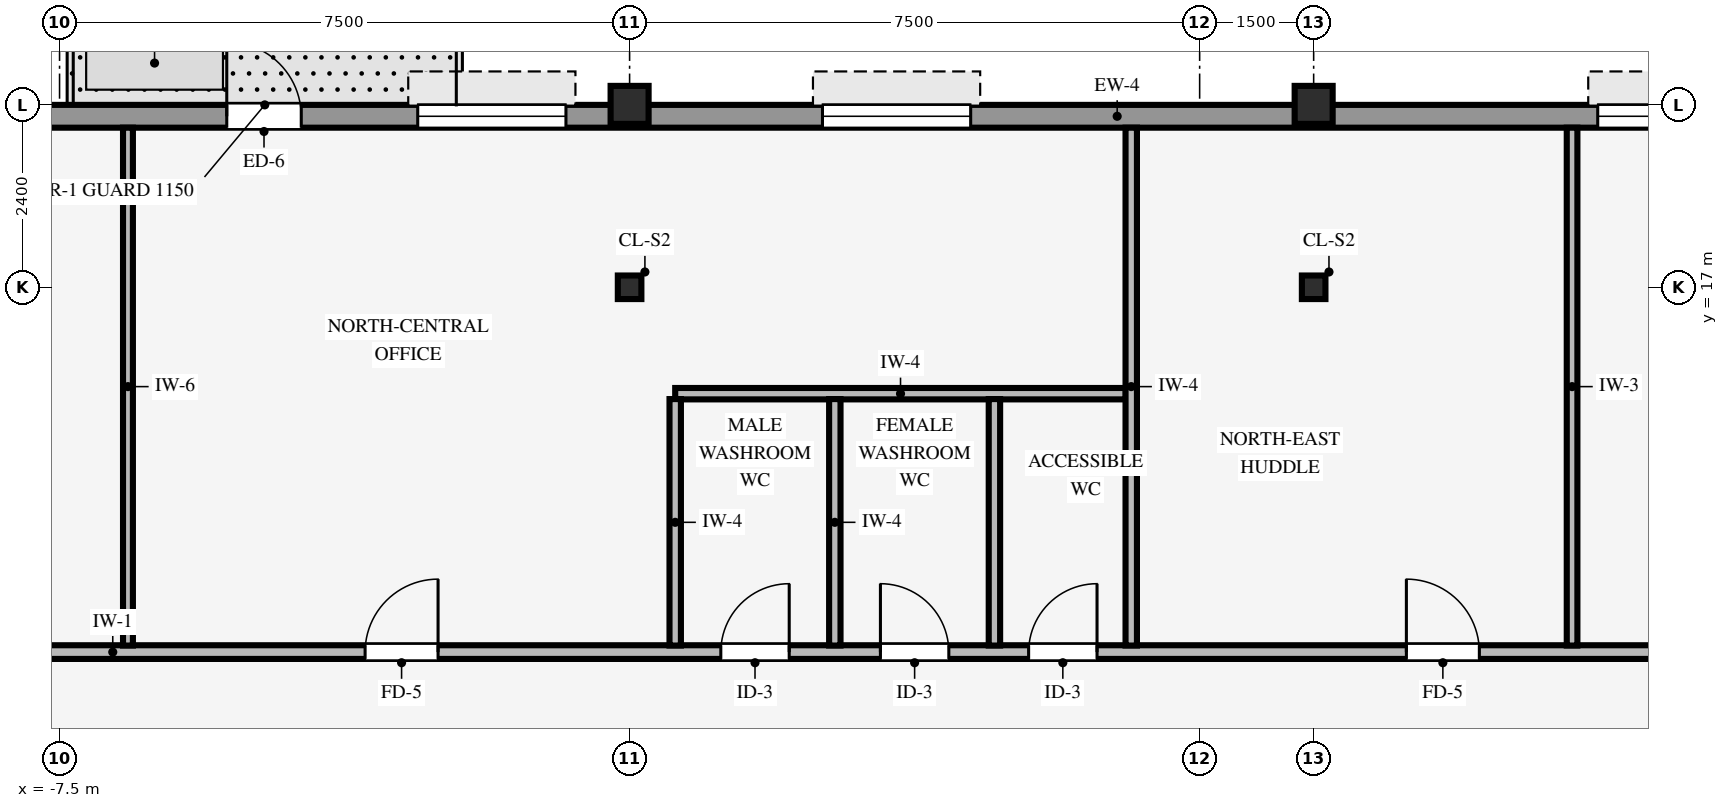
"""IFC4 building model, lengths in metres.
Left out: names, types, materials, properties, quantities, classifications, styles, units other than length and angle.
Written with IfcOpenShell. Run it as: python <this file> out.ifc"""

import sys

from ifc_helpers import new_model, si_unit, direction, frame, frame_2d, origin, origin_2d, place, context, subcontext, project, spatial, rectangle, hollow_rectangle, i_section, extrude, source, transform, mapped, element, fill, save


model = new_model("IFC4")
c1 = context("Model", 3, precision=1e-05, world=origin(), true_north=direction((0.0, 1.0)))
c2 = subcontext(c1, "Body", "Model", "MODEL_VIEW")
j1 = project(units=[si_unit("LENGTHUNIT", "METRE"), si_unit("PLANEANGLEUNIT", "RADIAN")], contexts=[c1])
p1 = place(None, origin())
s1 = spatial("IfcSite", under=j1, at=p1, CompositionType="ELEMENT")
p2 = place(p1, origin())
s2 = spatial("IfcBuilding", under=s1, at=p2, CompositionType="ELEMENT")
p3 = place(p2, frame((0.0, 0.0, 234.7)))
s3 = spatial("IfcBuildingStorey", under=s2, at=p3, CompositionType="ELEMENT", Elevation=234.7)
for number, where, z_axis, x_axis in (
    (1, (0.0, 19.4, 0.0), (0.0, 0.0, 1.0), (1.0, 0.0, 0.0)),
    (2, (9.0, 19.4, 0.0), (0.0, 0.0, 1.0), (1.0, 0.0, 0.0)),
):
    element("IfcColumn", number, at=place(p3, frame(where, z_axis=z_axis, x_axis=x_axis)), inside=s3, PredefinedType="COLUMN", context=c2, shape_type="SweptSolid", body=[
        extrude(hollow_rectangle(XDim=0.5, YDim=0.5, WallThickness=0.032, InnerFilletRadius=0.032, OuterFilletRadius=0.064, at=origin_2d()), origin(), (0.0, 0.0, 1.0), 3.37),
    ])
for number, where, z_axis, x_axis in (
    (3, (0.0, 17.0, 0.0), (0.0, 0.0, 1.0), (1.0, 0.0, 0.0)),
    (4, (9.0, 17.0, 0.0), (0.0, 0.0, 1.0), (1.0, 0.0, 0.0)),
):
    element("IfcColumn", number, at=place(p3, frame(where, z_axis=z_axis, x_axis=x_axis)), inside=s3, PredefinedType="COLUMN", context=c2, shape_type="SweptSolid", body=[
        extrude(i_section(OverallWidth=0.31, OverallDepth=0.31, WebThickness=0.015, FlangeThickness=0.015, FilletRadius=0.015, at=origin_2d()), origin(), (0.0, 0.0, 1.0), 3.37),
    ])
p4 = place(p3, frame((-24.3, 19.25, 0.0), z_axis=(0.0, 0.0, 1.0), x_axis=(1.0, 0.0, 0.0)))
e5 = element("IfcWall", 5, at=p4, inside=s3, PredefinedType="STANDARD", context=c2, shape_type="SweptSolid", body=[
    extrude(rectangle(XDim=41.0, YDim=0.3, at=frame_2d((20.5, 0.0))), origin(), (0.0, 0.0, 1.0), 2.705),
])
p5 = place(p4, frame((19.0, 0.0, 0.0)))
e6 = element("IfcOpeningElement", 6, at=p5, cuts=e5, PredefinedType="OPENING", context=c2, shape_type="SweptSolid", body=[
    extrude(rectangle(XDim=0.98, YDim=2.15, at=frame_2d((0.49, 1.075))), frame((0.0, 0.16, 0.0), z_axis=(0.0, -1.0, 0.0), x_axis=(1.0, 0.0, 0.0)), (0.0, 0.0, 1.0), 0.32),
])
p6 = place(p4, frame((2.462, 0.0, 0.8)))
e7 = element("IfcOpeningElement", 7, at=p6, cuts=e5, PredefinedType="OPENING", context=c2, shape_type="SweptSolid", body=[
    extrude(rectangle(XDim=1.95, YDim=1.48, at=frame_2d((0.975, 0.74))), frame((0.0, 0.16, 0.0), z_axis=(0.0, -1.0, 0.0), x_axis=(1.0, 0.0, 0.0)), (0.0, 0.0, 1.0), 0.32),
])
p7 = place(p4, frame((7.337, 0.0, 0.8)))
e8 = element("IfcOpeningElement", 8, at=p7, cuts=e5, PredefinedType="OPENING", context=c2, shape_type="SweptSolid", body=[
    extrude(rectangle(XDim=1.95, YDim=1.48, at=frame_2d((0.975, 0.74))), frame((0.0, 0.16, 0.0), z_axis=(0.0, -1.0, 0.0), x_axis=(1.0, 0.0, 0.0)), (0.0, 0.0, 1.0), 0.32),
])
p8 = place(p4, frame((21.512, 0.0, 0.8)))
e9 = element("IfcOpeningElement", 9, at=p8, cuts=e5, PredefinedType="OPENING", context=c2, shape_type="SweptSolid", body=[
    extrude(rectangle(XDim=1.95, YDim=1.48, at=frame_2d((0.975, 0.74))), frame((0.0, 0.16, 0.0), z_axis=(0.0, -1.0, 0.0), x_axis=(1.0, 0.0, 0.0)), (0.0, 0.0, 1.0), 0.32),
])
p9 = place(p4, frame((26.837, 0.0, 0.8)))
e10 = element("IfcOpeningElement", 10, at=p9, cuts=e5, PredefinedType="OPENING", context=c2, shape_type="SweptSolid", body=[
    extrude(rectangle(XDim=1.95, YDim=1.48, at=frame_2d((0.975, 0.74))), frame((0.0, 0.16, 0.0), z_axis=(0.0, -1.0, 0.0), x_axis=(1.0, 0.0, 0.0)), (0.0, 0.0, 1.0), 0.32),
])
p10 = place(p4, frame((37.038, 0.0, 0.8)))
e11 = element("IfcOpeningElement", 11, at=p10, cuts=e5, PredefinedType="OPENING", context=c2, shape_type="SweptSolid", body=[
    extrude(rectangle(XDim=1.95, YDim=1.48, at=frame_2d((0.975, 0.74))), frame((0.0, 0.16, 0.0), z_axis=(0.0, -1.0, 0.0), x_axis=(1.0, 0.0, 0.0)), (0.0, 0.0, 1.0), 0.32),
])
p11 = place(p3, frame((-15.0, 12.2, 0.0), z_axis=(0.0, 0.0, 1.0), x_axis=(1.0, 0.0, 0.0)))
e12 = element("IfcWall", 12, at=p11, inside=s3, PredefinedType="PARTITIONING", context=c2, shape_type="SweptSolid", body=[
    extrude(rectangle(XDim=30.8, YDim=0.18, at=frame_2d((15.4, 0.0))), origin(), (0.0, 0.0, 1.0), 3.36),
])
p12 = place(p11, frame((11.52, 0.0, 0.0)))
e13 = element("IfcOpeningElement", 13, at=p12, cuts=e12, PredefinedType="OPENING", context=c2, shape_type="SweptSolid", body=[
    extrude(rectangle(XDim=0.96, YDim=2.1, at=frame_2d((0.48, 1.05))), frame((0.0, 0.1, 0.0), z_axis=(0.0, -1.0, 0.0), x_axis=(1.0, 0.0, 0.0)), (0.0, 0.0, 1.0), 0.2),
])
p13 = place(p11, frame((25.22, 0.0, 0.0)))
e14 = element("IfcOpeningElement", 14, at=p13, cuts=e12, PredefinedType="OPENING", context=c2, shape_type="SweptSolid", body=[
    extrude(rectangle(XDim=0.96, YDim=2.1, at=frame_2d((0.48, 1.05))), frame((0.0, 0.1, 0.0), z_axis=(0.0, -1.0, 0.0), x_axis=(1.0, 0.0, 0.0)), (0.0, 0.0, 1.0), 0.2),
])
p14 = place(p11, frame((28.62, 0.0, 0.0)))
e15 = element("IfcOpeningElement", 15, at=p14, cuts=e12, PredefinedType="OPENING", context=c2, shape_type="SweptSolid", body=[
    extrude(rectangle(XDim=0.96, YDim=2.1, at=frame_2d((0.48, 1.05))), frame((0.0, 0.1, 0.0), z_axis=(0.0, -1.0, 0.0), x_axis=(1.0, 0.0, 0.0)), (0.0, 0.0, 1.0), 0.2),
])
p15 = place(p11, frame((3.92, 0.0, 0.0)))
e16 = element("IfcOpeningElement", 16, at=p15, cuts=e12, PredefinedType="OPENING", context=c2, shape_type="SweptSolid", body=[
    extrude(rectangle(XDim=0.96, YDim=2.1, at=frame_2d((0.48, 1.05))), frame((0.0, 0.1, 0.0), z_axis=(0.0, -1.0, 0.0), x_axis=(1.0, 0.0, 0.0)), (0.0, 0.0, 1.0), 0.2),
])
p16 = place(p11, frame((16.2, 0.0, 0.0)))
e17 = element("IfcOpeningElement", 17, at=p16, cuts=e12, PredefinedType="OPENING", context=c2, shape_type="SweptSolid", body=[
    extrude(rectangle(XDim=0.9, YDim=2.1, at=frame_2d((0.45, 1.05))), frame((0.0, 0.1, 0.0), z_axis=(0.0, -1.0, 0.0), x_axis=(1.0, 0.0, 0.0)), (0.0, 0.0, 1.0), 0.2),
])
p17 = place(p11, frame((18.3, 0.0, 0.0)))
e18 = element("IfcOpeningElement", 18, at=p17, cuts=e12, PredefinedType="OPENING", context=c2, shape_type="SweptSolid", body=[
    extrude(rectangle(XDim=0.9, YDim=2.1, at=frame_2d((0.45, 1.05))), frame((0.0, 0.1, 0.0), z_axis=(0.0, -1.0, 0.0), x_axis=(1.0, 0.0, 0.0)), (0.0, 0.0, 1.0), 0.2),
])
p18 = place(p11, frame((20.25, 0.0, 0.0)))
e19 = element("IfcOpeningElement", 19, at=p18, cuts=e12, PredefinedType="OPENING", context=c2, shape_type="SweptSolid", body=[
    extrude(rectangle(XDim=0.9, YDim=2.1, at=frame_2d((0.45, 1.05))), frame((0.0, 0.1, 0.0), z_axis=(0.0, -1.0, 0.0), x_axis=(1.0, 0.0, 0.0)), (0.0, 0.0, 1.0), 0.2),
])
p19 = place(p3, frame((0.6, 15.6, 0.0), z_axis=(0.0, 0.0, 1.0), x_axis=(1.0, 0.0, 0.0)))
e20 = element("IfcWall", 20, at=p19, inside=s3, PredefinedType="PARTITIONING", context=c2, shape_type="SweptSolid", body=[
    extrude(rectangle(XDim=5.929, YDim=0.15, at=frame_2d((2.964, 0.0))), origin(), (0.0, 0.0, 1.0), 3.36),
])
p20 = place(p3, frame((-6.6, 12.286, 0.0), z_axis=(0.0, 0.0, 1.0), x_axis=(0.0, 1.0, 0.0)))
e21 = element("IfcWall", 21, at=p20, inside=s3, PredefinedType="PARTITIONING", context=c2, shape_type="SweptSolid", body=[
    extrude(rectangle(XDim=6.814, YDim=0.13, at=frame_2d((3.407, 0.0))), origin(), (0.0, 0.0, 1.0), 3.36),
])
for number, where, z_axis, x_axis in (
    (22, (0.6, 12.286, 0.0), (0.0, 0.0, 1.0), (0.0, 1.0, 0.0)),
    (23, (2.7, 12.286, 0.0), (0.0, 0.0, 1.0), (0.0, 1.0, 0.0)),
    (24, (4.8, 12.286, 0.0), (0.0, 0.0, 1.0), (0.0, 1.0, 0.0)),
):
    element("IfcWall", number, at=place(p3, frame(where, z_axis=z_axis, x_axis=x_axis)), inside=s3, PredefinedType="PARTITIONING", context=c2, shape_type="SweptSolid", body=[
        extrude(rectangle(XDim=3.243, YDim=0.15, at=frame_2d((1.622, 0.0))), origin(), (0.0, 0.0, 1.0), 3.36),
    ])
p21 = place(p3, frame((6.6, 12.286, 0.0), z_axis=(0.0, 0.0, 1.0), x_axis=(0.0, 1.0, 0.0)))
e25 = element("IfcWall", 25, at=p21, inside=s3, PredefinedType="PARTITIONING", context=c2, shape_type="SweptSolid", body=[
    extrude(rectangle(XDim=6.814, YDim=0.15, at=frame_2d((3.407, 0.0))), origin(), (0.0, 0.0, 1.0), 3.36),
])
p22 = place(p3, frame((12.4, 12.286, 0.0), z_axis=(0.0, 0.0, 1.0), x_axis=(0.0, 1.0, 0.0)))
e26 = element("IfcWall", 26, at=p22, inside=s3, PredefinedType="PARTITIONING", context=c2, shape_type="SweptSolid", body=[
    extrude(rectangle(XDim=6.814, YDim=0.14, at=frame_2d((3.407, 0.0))), origin(), (0.0, 0.0, 1.0), 3.36),
])
m1 = source(origin(), c2, "Body", "SweptSolid", [
    extrude(rectangle(XDim=0.98, YDim=2.15, at=frame_2d((0.49, 1.075))), frame((0.0, 0.025, 0.0), z_axis=(0.0, -1.0, 0.0), x_axis=(1.0, 0.0, 0.0)), (0.0, 0.0, 1.0), 0.05),
])
p23 = place(p5, origin())
e27 = element("IfcDoor", 27, at=p23, inside=s3, OperationType="SINGLE_SWING_LEFT", PredefinedType="DOOR", context=c2, shape_type="MappedRepresentation", body=[
    mapped(m1, transform((0.0, 0.0, 0.0), scale=1.0)),
])
fill(e6, e27)
m2 = source(origin(), c2, "Body", "SweptSolid", [
    extrude(rectangle(XDim=1.95, YDim=1.48, at=frame_2d((0.975, 0.74))), frame((0.0, 0.03, 0.0), z_axis=(0.0, -1.0, 0.0), x_axis=(1.0, 0.0, 0.0)), (0.0, 0.0, 1.0), 0.06),
])
p24 = place(p8, origin())
e28 = element("IfcWindow", 28, at=p24, inside=s3, PartitioningType="SINGLE_PANEL", PredefinedType="WINDOW", context=c2, shape_type="MappedRepresentation", body=[
    mapped(m2, transform((0.0, 0.0, 0.0), scale=1.0)),
])
fill(e9, e28)
p25 = place(p9, origin())
e29 = element("IfcWindow", 29, at=p25, inside=s3, PartitioningType="SINGLE_PANEL", PredefinedType="WINDOW", context=c2, shape_type="MappedRepresentation", body=[
    mapped(m2, transform((0.0, 0.0, 0.0), scale=1.0)),
])
fill(e10, e29)
p26 = place(p10, origin())
e30 = element("IfcWindow", 30, at=p26, inside=s3, PartitioningType="SINGLE_PANEL", PredefinedType="WINDOW", context=c2, shape_type="MappedRepresentation", body=[
    mapped(m2, transform((0.0, 0.0, 0.0), scale=1.0)),
])
fill(e11, e30)
m3 = source(origin(), c2, "Body", "SweptSolid", [
    extrude(rectangle(XDim=0.96, YDim=2.1, at=frame_2d((0.48, 1.05))), frame((0.0, 0.025, 0.0), z_axis=(0.0, -1.0, 0.0), x_axis=(1.0, 0.0, 0.0)), (0.0, 0.0, 1.0), 0.05),
])
p27 = place(p12, origin())
e31 = element("IfcDoor", 31, at=p27, inside=s3, OperationType="SINGLE_SWING_RIGHT", PredefinedType="DOOR", context=c2, shape_type="MappedRepresentation", body=[
    mapped(m3, transform((0.0, 0.0, 0.0), scale=1.0)),
])
fill(e13, e31)
p28 = place(p13, origin())
e32 = element("IfcDoor", 32, at=p28, inside=s3, OperationType="SINGLE_SWING_LEFT", PredefinedType="DOOR", context=c2, shape_type="MappedRepresentation", body=[
    mapped(m3, transform((0.0, 0.0, 0.0), scale=1.0)),
])
fill(e14, e32)
m4 = source(origin(), c2, "Body", "SweptSolid", [
    extrude(rectangle(XDim=0.9, YDim=2.1, at=frame_2d((0.45, 1.05))), frame((0.0, 0.025, 0.0), z_axis=(0.0, -1.0, 0.0), x_axis=(1.0, 0.0, 0.0)), (0.0, 0.0, 1.0), 0.05),
])
p29 = place(p16, origin())
e33 = element("IfcDoor", 33, at=p29, inside=s3, OperationType="SINGLE_SWING_RIGHT", PredefinedType="DOOR", context=c2, shape_type="MappedRepresentation", body=[
    mapped(m4, transform((0.0, 0.0, 0.0), scale=1.0)),
])
fill(e17, e33)
p30 = place(p17, origin())
e34 = element("IfcDoor", 34, at=p30, inside=s3, OperationType="SINGLE_SWING_LEFT", PredefinedType="DOOR", context=c2, shape_type="MappedRepresentation", body=[
    mapped(m4, transform((0.0, 0.0, 0.0), scale=1.0)),
])
fill(e18, e34)
p31 = place(p18, origin())
e35 = element("IfcDoor", 35, at=p31, inside=s3, OperationType="SINGLE_SWING_RIGHT", PredefinedType="DOOR", context=c2, shape_type="MappedRepresentation", body=[
    mapped(m4, transform((0.0, 0.0, 0.0), scale=1.0)),
])
fill(e19, e35)
save(model, sys.argv[1])
